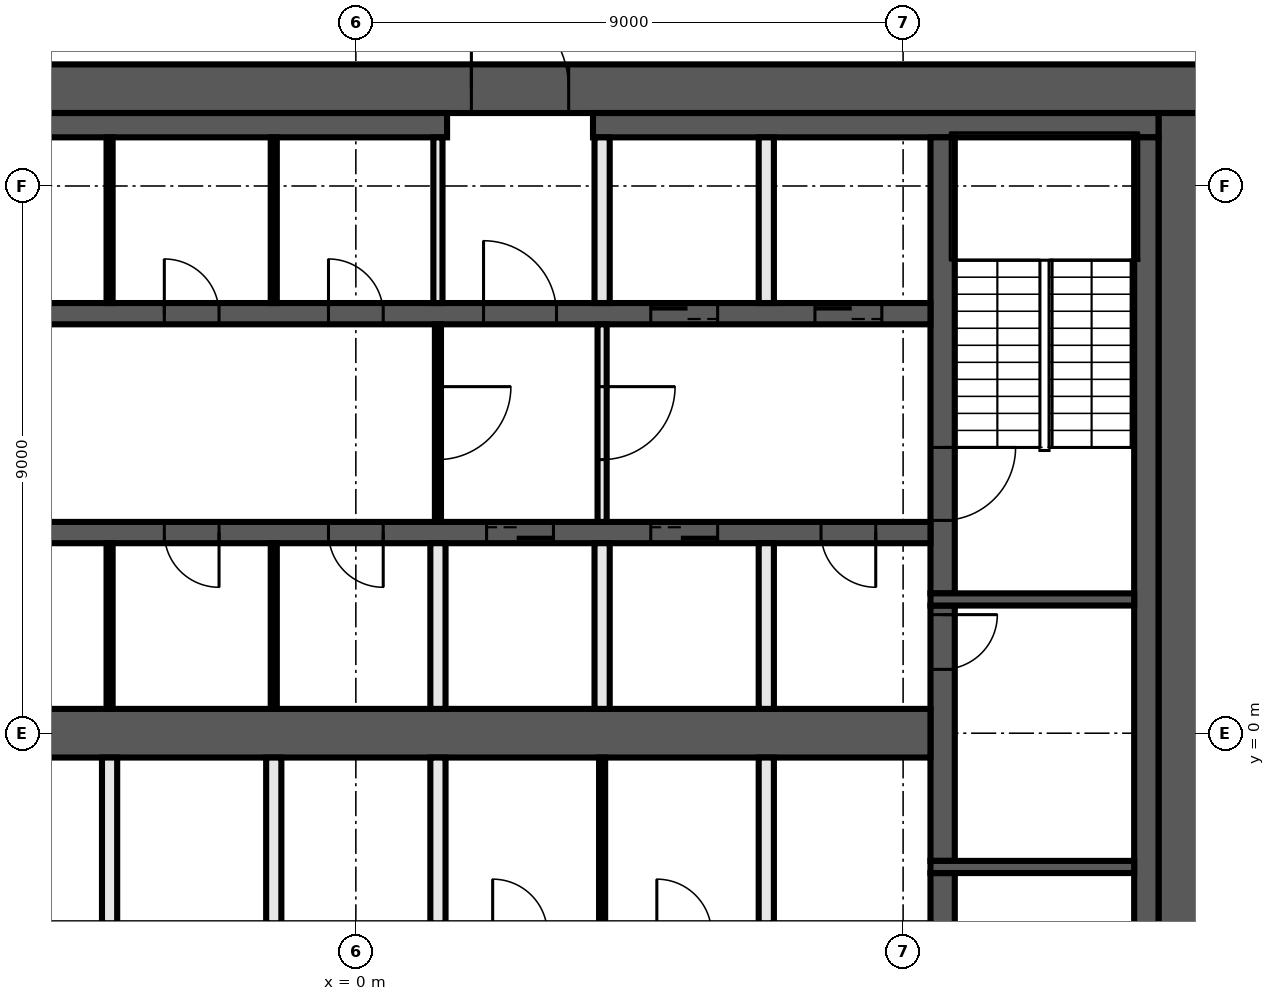
"""IFC4 building model, lengths in metres.
Left out: names, types, materials, properties, quantities, classifications, styles, units other than length and angle.
Written with IfcOpenShell. Run it as: python <this file> out.ifc"""

import sys

from ifc_helpers import new_model, si_unit, direction, frame, frame_2d, origin, place, context, subcontext, project, spatial, rectangle, extrude, element, fill, save


model = new_model("IFC4")
c1 = context("Model", 3, precision=1e-05, world=origin(), true_north=direction((0.0, 1.0)))
c2 = subcontext(c1, "Body", "Model", "MODEL_VIEW")
j1 = project(units=[si_unit("LENGTHUNIT", "METRE"), si_unit("PLANEANGLEUNIT", "RADIAN")], contexts=[c1])
p1 = place(None, origin())
s1 = spatial("IfcSite", under=j1, at=p1, CompositionType="ELEMENT")
p2 = place(p1, origin())
s2 = spatial("IfcBuilding", under=s1, at=p2, CompositionType="ELEMENT")
p3 = place(p2, frame((0.0, 0.0, 167.0)))
s3 = spatial("IfcBuildingStorey", under=s2, at=p3, CompositionType="ELEMENT", Elevation=167.0)
p4 = place(p3, frame((-14.0, 10.6, 0.0), z_axis=(0.0, 0.0, 1.0), x_axis=(1.0, 0.0, 0.0)))
e1 = element("IfcWall", 1, at=p4, inside=s3, PredefinedType="SHEAR", context=c2, shape_type="SweptSolid", body=[
    extrude(rectangle(XDim=28.0, YDim=0.8, at=frame_2d((14.0, 0.0))), origin(), (0.0, 0.0, 1.0), 3.82),
])
p5 = place(p4, frame((15.9, 0.0, 0.0)))
e2 = element("IfcOpeningElement", 2, at=p5, cuts=e1, PredefinedType="OPENING", context=c2, shape_type="SweptSolid", body=[
    extrude(rectangle(XDim=1.6, YDim=2.1, at=frame_2d((0.8, 1.05))), frame((0.0, 0.41, 0.0), z_axis=(0.0, -1.0, 0.0), x_axis=(1.0, 0.0, 0.0)), (0.0, 0.0, 1.0), 0.82),
])
p6 = place(p3, frame((13.6, 10.2, 0.0), z_axis=(0.0, 0.0, 1.0), x_axis=(0.0, -1.0, 0.0)))
e3 = element("IfcWall", 3, at=p6, inside=s3, PredefinedType="SHEAR", context=c2, shape_type="SweptSolid", body=[
    extrude(rectangle(XDim=20.4, YDim=0.8, at=frame_2d((10.2, 0.0))), origin(), (0.0, 0.0, 1.0), 3.82),
])
p7 = place(p3, frame((-13.2, 10.0, 0.0), z_axis=(0.0, 0.0, 1.0), x_axis=(1.0, 0.0, 0.0)))
e4 = element("IfcWall", 4, at=p7, inside=s3, PredefinedType="SHEAR", context=c2, shape_type="SweptSolid", body=[
    extrude(rectangle(XDim=14.7, YDim=0.4, at=frame_2d((7.35, 0.0))), origin(), (0.0, 0.0, 1.0), 3.82),
])
p8 = place(p3, frame((3.9, 10.0, 0.0), z_axis=(0.0, 0.0, 1.0), x_axis=(1.0, 0.0, 0.0)))
e5 = element("IfcWall", 5, at=p8, inside=s3, PredefinedType="SHEAR", context=c2, shape_type="SweptSolid", body=[
    extrude(rectangle(XDim=9.3, YDim=0.4, at=frame_2d((4.65, 0.0))), origin(), (0.0, 0.0, 1.0), 3.82),
])
p9 = place(p3, frame((13.0, 9.8, 0.0), z_axis=(0.0, 0.0, 1.0), x_axis=(0.0, -1.0, 0.0)))
e6 = element("IfcWall", 6, at=p9, inside=s3, PredefinedType="SHEAR", context=c2, shape_type="SweptSolid", body=[
    extrude(rectangle(XDim=19.6, YDim=0.4, at=frame_2d((9.8, 0.0))), origin(), (0.0, 0.0, 1.0), 3.82),
])
p10 = place(p3, frame((9.65, -2.3, 0.0), z_axis=(0.0, 0.0, 1.0), x_axis=(0.0, -1.0, 0.0)))
e7 = element("IfcWall", 7, at=p10, inside=s3, PredefinedType="SHEAR", context=c2, shape_type="SweptSolid", body=[
    extrude(rectangle(XDim=7.5, YDim=0.4, at=frame_2d((3.75, 0.0))), origin(), (0.0, 0.0, 1.0), 3.82),
])
p11 = place(p10, frame((1.2, 0.0, 0.0)))
e8 = element("IfcOpeningElement", 8, at=p11, cuts=e7, PredefinedType="OPENING", context=c2, shape_type="SweptSolid", body=[
    extrude(rectangle(XDim=1.2, YDim=2.1, at=frame_2d((0.6, 1.05))), frame((0.0, 0.21, 0.0), z_axis=(0.0, -1.0, 0.0), x_axis=(1.0, 0.0, 0.0)), (0.0, 0.0, 1.0), 0.42),
])
p12 = place(p3, frame((9.65, 2.1, 0.0), z_axis=(0.0, 0.0, 1.0), x_axis=(0.0, -1.0, 0.0)))
e9 = element("IfcWall", 9, at=p12, inside=s3, PredefinedType="SHEAR", context=c2, shape_type="SweptSolid", body=[
    extrude(rectangle(XDim=4.2, YDim=0.4, at=frame_2d((2.1, 0.0))), origin(), (0.0, 0.0, 1.0), 3.82),
])
p13 = place(p12, frame((0.15, 0.0, 0.0)))
e10 = element("IfcOpeningElement", 10, at=p13, cuts=e9, PredefinedType="OPENING", context=c2, shape_type="SweptSolid", body=[
    extrude(rectangle(XDim=0.9, YDim=2.1, at=frame_2d((0.45, 1.05))), frame((0.0, 0.21, 0.0), z_axis=(0.0, -1.0, 0.0), x_axis=(1.0, 0.0, 0.0)), (0.0, 0.0, 1.0), 0.42),
])
p14 = place(p3, frame((9.65, 9.8, 0.0), z_axis=(0.0, 0.0, 1.0), x_axis=(0.0, -1.0, 0.0)))
e11 = element("IfcWall", 11, at=p14, inside=s3, PredefinedType="SHEAR", context=c2, shape_type="SweptSolid", body=[
    extrude(rectangle(XDim=7.5, YDim=0.4, at=frame_2d((3.75, 0.0))), origin(), (0.0, 0.0, 1.0), 3.82),
])
p15 = place(p14, frame((5.1, 0.0, 0.0)))
e12 = element("IfcOpeningElement", 12, at=p15, cuts=e11, PredefinedType="OPENING", context=c2, shape_type="SweptSolid", body=[
    extrude(rectangle(XDim=1.2, YDim=2.1, at=frame_2d((0.6, 1.05))), frame((0.0, 0.21, 0.0), z_axis=(0.0, -1.0, 0.0), x_axis=(1.0, 0.0, 0.0)), (0.0, 0.0, 1.0), 0.42),
])
for number, where, z_axis, x_axis in (
    (13, (9.45, 2.2, 0.0), (0.0, 0.0, 1.0), (1.0, 0.0, 0.0)),
    (14, (9.45, -2.2, 0.0), (0.0, 0.0, 1.0), (1.0, 0.0, 0.0)),
):
    element("IfcWall", number, at=place(p3, frame(where, z_axis=z_axis, x_axis=x_axis)), inside=s3, PredefinedType="SHEAR", context=c2, shape_type="SweptSolid", body=[
        extrude(rectangle(XDim=3.35, YDim=0.2, at=frame_2d((1.675, 0.0))), origin(), (0.0, 0.0, 1.0), 3.82),
    ])
p16 = place(p3, frame((-9.45, 6.9, 0.0), z_axis=(0.0, 0.0, 1.0), x_axis=(1.0, 0.0, 0.0)))
e15 = element("IfcWall", 15, at=p16, inside=s3, PredefinedType="SHEAR", context=c2, shape_type="SweptSolid", body=[
    extrude(rectangle(XDim=18.9, YDim=0.35, at=frame_2d((9.45, 0.0))), origin(), (0.0, 0.0, 1.0), 3.82),
])
p17 = place(p16, frame((11.55, 0.0, 0.0)))
e16 = element("IfcOpeningElement", 16, at=p17, cuts=e15, PredefinedType="OPENING", context=c2, shape_type="SweptSolid", body=[
    extrude(rectangle(XDim=1.2, YDim=2.1, at=frame_2d((0.6, 1.05))), frame((0.0, 0.185, 0.0), z_axis=(0.0, -1.0, 0.0), x_axis=(1.0, 0.0, 0.0)), (0.0, 0.0, 1.0), 0.37),
])
p18 = place(p16, frame((14.3, 0.0, 0.0)))
e17 = element("IfcOpeningElement", 17, at=p18, cuts=e15, PredefinedType="OPENING", context=c2, shape_type="SweptSolid", body=[
    extrude(rectangle(XDim=1.1, YDim=2.1, at=frame_2d((0.55, 1.05))), frame((0.0, 0.185, 0.0), z_axis=(0.0, -1.0, 0.0), x_axis=(1.0, 0.0, 0.0)), (0.0, 0.0, 1.0), 0.37),
])
p19 = place(p16, frame((17.0, 0.0, 0.0)))
e18 = element("IfcOpeningElement", 18, at=p19, cuts=e15, PredefinedType="OPENING", context=c2, shape_type="SweptSolid", body=[
    extrude(rectangle(XDim=1.1, YDim=2.1, at=frame_2d((0.55, 1.05))), frame((0.0, 0.185, 0.0), z_axis=(0.0, -1.0, 0.0), x_axis=(1.0, 0.0, 0.0)), (0.0, 0.0, 1.0), 0.37),
])
p20 = place(p16, frame((2.25, 0.0, 0.0)))
e19 = element("IfcOpeningElement", 19, at=p20, cuts=e15, PredefinedType="OPENING", context=c2, shape_type="SweptSolid", body=[
    extrude(rectangle(XDim=0.9, YDim=2.1, at=frame_2d((0.45, 1.05))), frame((0.0, 0.185, 0.0), z_axis=(0.0, -1.0, 0.0), x_axis=(1.0, 0.0, 0.0)), (0.0, 0.0, 1.0), 0.37),
])
p21 = place(p16, frame((6.3, 0.0, 0.0)))
e20 = element("IfcOpeningElement", 20, at=p21, cuts=e15, PredefinedType="OPENING", context=c2, shape_type="SweptSolid", body=[
    extrude(rectangle(XDim=0.9, YDim=2.1, at=frame_2d((0.45, 1.05))), frame((0.0, 0.185, 0.0), z_axis=(0.0, -1.0, 0.0), x_axis=(1.0, 0.0, 0.0)), (0.0, 0.0, 1.0), 0.37),
])
p22 = place(p16, frame((9.0, 0.0, 0.0)))
e21 = element("IfcOpeningElement", 21, at=p22, cuts=e15, PredefinedType="OPENING", context=c2, shape_type="SweptSolid", body=[
    extrude(rectangle(XDim=0.9, YDim=2.1, at=frame_2d((0.45, 1.05))), frame((0.0, 0.185, 0.0), z_axis=(0.0, -1.0, 0.0), x_axis=(1.0, 0.0, 0.0)), (0.0, 0.0, 1.0), 0.37),
])
p23 = place(p3, frame((9.45, 3.3, 0.0), z_axis=(0.0, 0.0, 1.0), x_axis=(-1.0, 0.0, 0.0)))
e22 = element("IfcWall", 22, at=p23, inside=s3, PredefinedType="SHEAR", context=c2, shape_type="SweptSolid", body=[
    extrude(rectangle(XDim=18.9, YDim=0.35, at=frame_2d((9.45, 0.0))), origin(), (0.0, 0.0, 1.0), 3.82),
])
p24 = place(p23, frame((6.2, 0.0, 0.0)))
e23 = element("IfcOpeningElement", 23, at=p24, cuts=e22, PredefinedType="OPENING", context=c2, shape_type="SweptSolid", body=[
    extrude(rectangle(XDim=1.1, YDim=2.1, at=frame_2d((0.55, 1.05))), frame((0.0, 0.185, 0.0), z_axis=(0.0, -1.0, 0.0), x_axis=(1.0, 0.0, 0.0)), (0.0, 0.0, 1.0), 0.37),
])
p25 = place(p23, frame((3.5, 0.0, 0.0)))
e24 = element("IfcOpeningElement", 24, at=p25, cuts=e22, PredefinedType="OPENING", context=c2, shape_type="SweptSolid", body=[
    extrude(rectangle(XDim=1.1, YDim=2.1, at=frame_2d((0.55, 1.05))), frame((0.0, 0.185, 0.0), z_axis=(0.0, -1.0, 0.0), x_axis=(1.0, 0.0, 0.0)), (0.0, 0.0, 1.0), 0.37),
])
p26 = place(p23, frame((0.9, 0.0, 0.0)))
e25 = element("IfcOpeningElement", 25, at=p26, cuts=e22, PredefinedType="OPENING", context=c2, shape_type="SweptSolid", body=[
    extrude(rectangle(XDim=0.9, YDim=2.1, at=frame_2d((0.45, 1.05))), frame((0.0, 0.185, 0.0), z_axis=(0.0, -1.0, 0.0), x_axis=(1.0, 0.0, 0.0)), (0.0, 0.0, 1.0), 0.37),
])
p27 = place(p23, frame((15.75, 0.0, 0.0)))
e26 = element("IfcOpeningElement", 26, at=p27, cuts=e22, PredefinedType="OPENING", context=c2, shape_type="SweptSolid", body=[
    extrude(rectangle(XDim=0.9, YDim=2.1, at=frame_2d((0.45, 1.05))), frame((0.0, 0.185, 0.0), z_axis=(0.0, -1.0, 0.0), x_axis=(1.0, 0.0, 0.0)), (0.0, 0.0, 1.0), 0.37),
])
p28 = place(p23, frame((11.7, 0.0, 0.0)))
e27 = element("IfcOpeningElement", 27, at=p28, cuts=e22, PredefinedType="OPENING", context=c2, shape_type="SweptSolid", body=[
    extrude(rectangle(XDim=0.9, YDim=2.1, at=frame_2d((0.45, 1.05))), frame((0.0, 0.185, 0.0), z_axis=(0.0, -1.0, 0.0), x_axis=(1.0, 0.0, 0.0)), (0.0, 0.0, 1.0), 0.37),
])
p29 = place(p23, frame((9.0, 0.0, 0.0)))
e28 = element("IfcOpeningElement", 28, at=p29, cuts=e22, PredefinedType="OPENING", context=c2, shape_type="SweptSolid", body=[
    extrude(rectangle(XDim=0.9, YDim=2.1, at=frame_2d((0.45, 1.05))), frame((0.0, 0.185, 0.0), z_axis=(0.0, -1.0, 0.0), x_axis=(1.0, 0.0, 0.0)), (0.0, 0.0, 1.0), 0.37),
])
p30 = place(p3, frame((-9.45, 0.0, 0.0), z_axis=(0.0, 0.0, 1.0), x_axis=(1.0, 0.0, 0.0)))
e29 = element("IfcWall", 29, at=p30, inside=s3, PredefinedType="SHEAR", context=c2, shape_type="SweptSolid", body=[
    extrude(rectangle(XDim=18.9, YDim=0.8, at=frame_2d((9.45, 0.0))), origin(), (0.0, 0.0, 1.0), 3.82),
])
for number, where, z_axis, x_axis in (
    (30, (6.75, -3.125, 0.0), (0.0, 0.0, 1.0), (0.0, 1.0, 0.0)),
    (31, (6.75, 0.4, 0.0), (0.0, 0.0, 1.0), (0.0, 1.0, 0.0)),
    (32, (6.75, 7.075, 0.0), (0.0, 0.0, 1.0), (0.0, 1.0, 0.0)),
):
    element("IfcWall", number, at=place(p3, frame(where, z_axis=z_axis, x_axis=x_axis)), inside=s3, PredefinedType="SOLIDWALL", context=c2, shape_type="SweptSolid", body=[
        extrude(rectangle(XDim=2.725, YDim=0.25, at=frame_2d((1.363, 0.0))), origin(), (0.0, 0.0, 1.0), 3.82),
    ])
p31 = place(p3, frame((4.05, 6.725, 0.0), z_axis=(0.0, 0.0, 1.0), x_axis=(0.0, -1.0, 0.0)))
e33 = element("IfcWall", 33, at=p31, inside=s3, PredefinedType="PARTITIONING", context=c2, shape_type="SweptSolid", body=[
    extrude(rectangle(XDim=3.25, YDim=0.15, at=frame_2d((1.625, 0.0))), origin(), (0.0, 0.0, 1.0), 3.82),
])
p32 = place(p31, frame((1.025, 0.0, 0.0)))
e34 = element("IfcOpeningElement", 34, at=p32, cuts=e33, PredefinedType="OPENING", context=c2, shape_type="SweptSolid", body=[
    extrude(rectangle(XDim=1.2, YDim=2.1, at=frame_2d((0.6, 1.05))), frame((0.0, 0.085, 0.0), z_axis=(0.0, -1.0, 0.0), x_axis=(1.0, 0.0, 0.0)), (0.0, 0.0, 1.0), 0.17),
])
p33 = place(p3, frame((4.05, -3.125, 0.0), z_axis=(0.0, 0.0, 1.0), x_axis=(0.0, 1.0, 0.0)))
e35 = element("IfcWall", 35, at=p33, inside=s3, PredefinedType="PARTITIONING", context=c2, shape_type="SweptSolid", body=[
    extrude(rectangle(XDim=2.725, YDim=0.1, at=frame_2d((1.363, 0.0))), origin(), (0.0, 0.0, 1.0), 3.82),
])
for number, where, z_axis, x_axis in (
    (36, (4.05, 0.4, 0.0), (0.0, 0.0, 1.0), (0.0, 1.0, 0.0)),
    (37, (4.05, 7.075, 0.0), (0.0, 0.0, 1.0), (0.0, 1.0, 0.0)),
):
    element("IfcWall", number, at=place(p3, frame(where, z_axis=z_axis, x_axis=x_axis)), inside=s3, PredefinedType="SOLIDWALL", context=c2, shape_type="SweptSolid", body=[
        extrude(rectangle(XDim=2.725, YDim=0.25, at=frame_2d((1.363, 0.0))), origin(), (0.0, 0.0, 1.0), 3.82),
    ])
p34 = place(p3, frame((1.35, 7.075, 0.0), z_axis=(0.0, 0.0, 1.0), x_axis=(0.0, 1.0, 0.0)))
e38 = element("IfcWall", 38, at=p34, inside=s3, PredefinedType="PARTITIONING", context=c2, shape_type="SweptSolid", body=[
    extrude(rectangle(XDim=2.725, YDim=0.15, at=frame_2d((1.363, 0.0))), origin(), (0.0, 0.0, 1.0), 3.82),
])
p35 = place(p3, frame((1.35, 6.725, 0.0), z_axis=(0.0, 0.0, 1.0), x_axis=(0.0, -1.0, 0.0)))
e39 = element("IfcWall", 39, at=p35, inside=s3, PredefinedType="PARTITIONING", context=c2, shape_type="SweptSolid", body=[
    extrude(rectangle(XDim=3.25, YDim=0.1, at=frame_2d((1.625, 0.0))), origin(), (0.0, 0.0, 1.0), 3.82),
])
p36 = place(p35, frame((1.025, 0.0, 0.0)))
e40 = element("IfcOpeningElement", 40, at=p36, cuts=e39, PredefinedType="OPENING", context=c2, shape_type="SweptSolid", body=[
    extrude(rectangle(XDim=1.2, YDim=2.1, at=frame_2d((0.6, 1.05))), frame((0.0, 0.06, 0.0), z_axis=(0.0, -1.0, 0.0), x_axis=(1.0, 0.0, 0.0)), (0.0, 0.0, 1.0), 0.12),
])
for number, where, z_axis, x_axis in (
    (41, (1.35, -3.125, 0.0), (0.0, 0.0, 1.0), (0.0, 1.0, 0.0)),
    (42, (1.35, 0.4, 0.0), (0.0, 0.0, 1.0), (0.0, 1.0, 0.0)),
):
    element("IfcWall", number, at=place(p3, frame(where, z_axis=z_axis, x_axis=x_axis)), inside=s3, PredefinedType="SOLIDWALL", context=c2, shape_type="SweptSolid", body=[
        extrude(rectangle(XDim=2.725, YDim=0.25, at=frame_2d((1.363, 0.0))), origin(), (0.0, 0.0, 1.0), 3.82),
    ])
for number, where, z_axis, x_axis in (
    (43, (-1.35, 0.4, 0.0), (0.0, 0.0, 1.0), (0.0, 1.0, 0.0)),
    (44, (-1.35, 7.075, 0.0), (0.0, 0.0, 1.0), (0.0, 1.0, 0.0)),
):
    element("IfcWall", number, at=place(p3, frame(where, z_axis=z_axis, x_axis=x_axis)), inside=s3, PredefinedType="PARTITIONING", context=c2, shape_type="SweptSolid", body=[
        extrude(rectangle(XDim=2.725, YDim=0.1, at=frame_2d((1.363, 0.0))), origin(), (0.0, 0.0, 1.0), 3.82),
    ])
p37 = place(p3, frame((-1.35, -3.125, 0.0), z_axis=(0.0, 0.0, 1.0), x_axis=(0.0, 1.0, 0.0)))
e45 = element("IfcWall", 45, at=p37, inside=s3, PredefinedType="SOLIDWALL", context=c2, shape_type="SweptSolid", body=[
    extrude(rectangle(XDim=2.725, YDim=0.25, at=frame_2d((1.363, 0.0))), origin(), (0.0, 0.0, 1.0), 3.82),
])
for number, where, z_axis, x_axis in (
    (46, (-4.05, 0.4, 0.0), (0.0, 0.0, 1.0), (0.0, 1.0, 0.0)),
    (47, (-4.05, 7.075, 0.0), (0.0, 0.0, 1.0), (0.0, 1.0, 0.0)),
):
    element("IfcWall", number, at=place(p3, frame(where, z_axis=z_axis, x_axis=x_axis)), inside=s3, PredefinedType="PARTITIONING", context=c2, shape_type="SweptSolid", body=[
        extrude(rectangle(XDim=2.725, YDim=0.1, at=frame_2d((1.363, 0.0))), origin(), (0.0, 0.0, 1.0), 3.82),
    ])
p38 = place(p3, frame((-4.05, -3.125, 0.0), z_axis=(0.0, 0.0, 1.0), x_axis=(0.0, 1.0, 0.0)))
e48 = element("IfcWall", 48, at=p38, inside=s3, PredefinedType="SOLIDWALL", context=c2, shape_type="SweptSolid", body=[
    extrude(rectangle(XDim=2.725, YDim=0.25, at=frame_2d((1.363, 0.0))), origin(), (0.0, 0.0, 1.0), 3.82),
])
p39 = place(p13, origin())
e49 = element("IfcDoor", 49, at=p39, inside=s3, OperationType="SINGLE_SWING_RIGHT", PredefinedType="DOOR", context=c2, shape_type="SweptSolid", body=[
    extrude(rectangle(XDim=0.9, YDim=2.1, at=frame_2d((0.45, 1.05))), frame((0.0, 0.025, 0.0), z_axis=(0.0, -1.0, 0.0), x_axis=(1.0, 0.0, 0.0)), (0.0, 0.0, 1.0), 0.05),
])
fill(e10, e49)
p40 = place(p5, origin())
e50 = element("IfcDoor", 50, at=p40, inside=s3, OperationType="DOUBLE_DOOR_SINGLE_SWING", PredefinedType="DOOR", context=c2, shape_type="SweptSolid", body=[
    extrude(rectangle(XDim=1.6, YDim=2.1, at=frame_2d((0.8, 1.05))), frame((0.0, 0.025, 0.0), z_axis=(0.0, -1.0, 0.0), x_axis=(1.0, 0.0, 0.0)), (0.0, 0.0, 1.0), 0.05),
])
fill(e2, e50)
p41 = place(p17, origin())
e51 = element("IfcDoor", 51, at=p41, inside=s3, OperationType="SINGLE_SWING_LEFT", PredefinedType="DOOR", context=c2, shape_type="SweptSolid", body=[
    extrude(rectangle(XDim=1.2, YDim=2.1, at=frame_2d((0.6, 1.05))), frame((0.0, 0.025, 0.0), z_axis=(0.0, -1.0, 0.0), x_axis=(1.0, 0.0, 0.0)), (0.0, 0.0, 1.0), 0.05),
])
fill(e16, e51)
p42 = place(p18, origin())
e52 = element("IfcDoor", 52, at=p42, inside=s3, OperationType="DOUBLE_DOOR_SLIDING", PredefinedType="DOOR", context=c2, shape_type="SweptSolid", body=[
    extrude(rectangle(XDim=1.1, YDim=2.1, at=frame_2d((0.55, 1.05))), frame((0.0, 0.025, 0.0), z_axis=(0.0, -1.0, 0.0), x_axis=(1.0, 0.0, 0.0)), (0.0, 0.0, 1.0), 0.05),
])
fill(e17, e52)
p43 = place(p19, origin())
e53 = element("IfcDoor", 53, at=p43, inside=s3, OperationType="DOUBLE_DOOR_SLIDING", PredefinedType="DOOR", context=c2, shape_type="SweptSolid", body=[
    extrude(rectangle(XDim=1.1, YDim=2.1, at=frame_2d((0.55, 1.05))), frame((0.0, 0.025, 0.0), z_axis=(0.0, -1.0, 0.0), x_axis=(1.0, 0.0, 0.0)), (0.0, 0.0, 1.0), 0.05),
])
fill(e18, e53)
p44 = place(p24, origin())
e54 = element("IfcDoor", 54, at=p44, inside=s3, OperationType="DOUBLE_DOOR_SLIDING", PredefinedType="DOOR", context=c2, shape_type="SweptSolid", body=[
    extrude(rectangle(XDim=1.1, YDim=2.1, at=frame_2d((0.55, 1.05))), frame((0.0, 0.025, 0.0), z_axis=(0.0, -1.0, 0.0), x_axis=(1.0, 0.0, 0.0)), (0.0, 0.0, 1.0), 0.05),
])
fill(e23, e54)
p45 = place(p25, origin())
e55 = element("IfcDoor", 55, at=p45, inside=s3, OperationType="DOUBLE_DOOR_SLIDING", PredefinedType="DOOR", context=c2, shape_type="SweptSolid", body=[
    extrude(rectangle(XDim=1.1, YDim=2.1, at=frame_2d((0.55, 1.05))), frame((0.0, 0.025, 0.0), z_axis=(0.0, -1.0, 0.0), x_axis=(1.0, 0.0, 0.0)), (0.0, 0.0, 1.0), 0.05),
])
fill(e24, e55)
p46 = place(p26, origin())
e56 = element("IfcDoor", 56, at=p46, inside=s3, OperationType="SINGLE_SWING_LEFT", PredefinedType="DOOR", context=c2, shape_type="SweptSolid", body=[
    extrude(rectangle(XDim=0.9, YDim=2.1, at=frame_2d((0.45, 1.05))), frame((0.0, 0.025, 0.0), z_axis=(0.0, -1.0, 0.0), x_axis=(1.0, 0.0, 0.0)), (0.0, 0.0, 1.0), 0.05),
])
fill(e25, e56)
p47 = place(p21, origin())
e57 = element("IfcDoor", 57, at=p47, inside=s3, OperationType="SINGLE_SWING_LEFT", PredefinedType="DOOR", context=c2, shape_type="SweptSolid", body=[
    extrude(rectangle(XDim=0.9, YDim=2.1, at=frame_2d((0.45, 1.05))), frame((0.0, 0.025, 0.0), z_axis=(0.0, -1.0, 0.0), x_axis=(1.0, 0.0, 0.0)), (0.0, 0.0, 1.0), 0.05),
])
fill(e20, e57)
p48 = place(p22, origin())
e58 = element("IfcDoor", 58, at=p48, inside=s3, OperationType="SINGLE_SWING_RIGHT", PredefinedType="DOOR", context=c2, shape_type="SweptSolid", body=[
    extrude(rectangle(XDim=0.9, YDim=2.1, at=frame_2d((0.45, 1.05))), frame((0.0, 0.025, 0.0), z_axis=(0.0, -1.0, 0.0), x_axis=(1.0, 0.0, 0.0)), (0.0, 0.0, 1.0), 0.05),
])
fill(e21, e58)
p49 = place(p28, origin())
e59 = element("IfcDoor", 59, at=p49, inside=s3, OperationType="SINGLE_SWING_RIGHT", PredefinedType="DOOR", context=c2, shape_type="SweptSolid", body=[
    extrude(rectangle(XDim=0.9, YDim=2.1, at=frame_2d((0.45, 1.05))), frame((0.0, 0.025, 0.0), z_axis=(0.0, -1.0, 0.0), x_axis=(1.0, 0.0, 0.0)), (0.0, 0.0, 1.0), 0.05),
])
fill(e27, e59)
p50 = place(p29, origin())
e60 = element("IfcDoor", 60, at=p50, inside=s3, OperationType="SINGLE_SWING_LEFT", PredefinedType="DOOR", context=c2, shape_type="SweptSolid", body=[
    extrude(rectangle(XDim=0.9, YDim=2.1, at=frame_2d((0.45, 1.05))), frame((0.0, 0.025, 0.0), z_axis=(0.0, -1.0, 0.0), x_axis=(1.0, 0.0, 0.0)), (0.0, 0.0, 1.0), 0.05),
])
fill(e28, e60)
p51 = place(p15, origin())
e61 = element("IfcDoor", 61, at=p51, inside=s3, OperationType="SINGLE_SWING_LEFT", PredefinedType="DOOR", context=c2, shape_type="SweptSolid", body=[
    extrude(rectangle(XDim=1.2, YDim=2.1, at=frame_2d((0.6, 1.05))), frame((0.0, 0.025, 0.0), z_axis=(0.0, -1.0, 0.0), x_axis=(1.0, 0.0, 0.0)), (0.0, 0.0, 1.0), 0.05),
])
fill(e12, e61)
p52 = place(p36, origin())
e62 = element("IfcDoor", 62, at=p52, inside=s3, OperationType="SINGLE_SWING_LEFT", PredefinedType="DOOR", context=c2, shape_type="SweptSolid", body=[
    extrude(rectangle(XDim=1.2, YDim=2.1, at=frame_2d((0.6, 1.05))), frame((0.0, 0.025, 0.0), z_axis=(0.0, -1.0, 0.0), x_axis=(1.0, 0.0, 0.0)), (0.0, 0.0, 1.0), 0.05),
])
fill(e40, e62)
p53 = place(p32, origin())
e63 = element("IfcDoor", 63, at=p53, inside=s3, OperationType="SINGLE_SWING_RIGHT", PredefinedType="DOOR", context=c2, shape_type="SweptSolid", body=[
    extrude(rectangle(XDim=1.2, YDim=2.1, at=frame_2d((0.6, 1.05))), frame((0.0, 0.025, 0.0), z_axis=(0.0, -1.0, 0.0), x_axis=(1.0, 0.0, 0.0)), (0.0, 0.0, 1.0), 0.05),
])
fill(e34, e63)
save(model, sys.argv[1])
